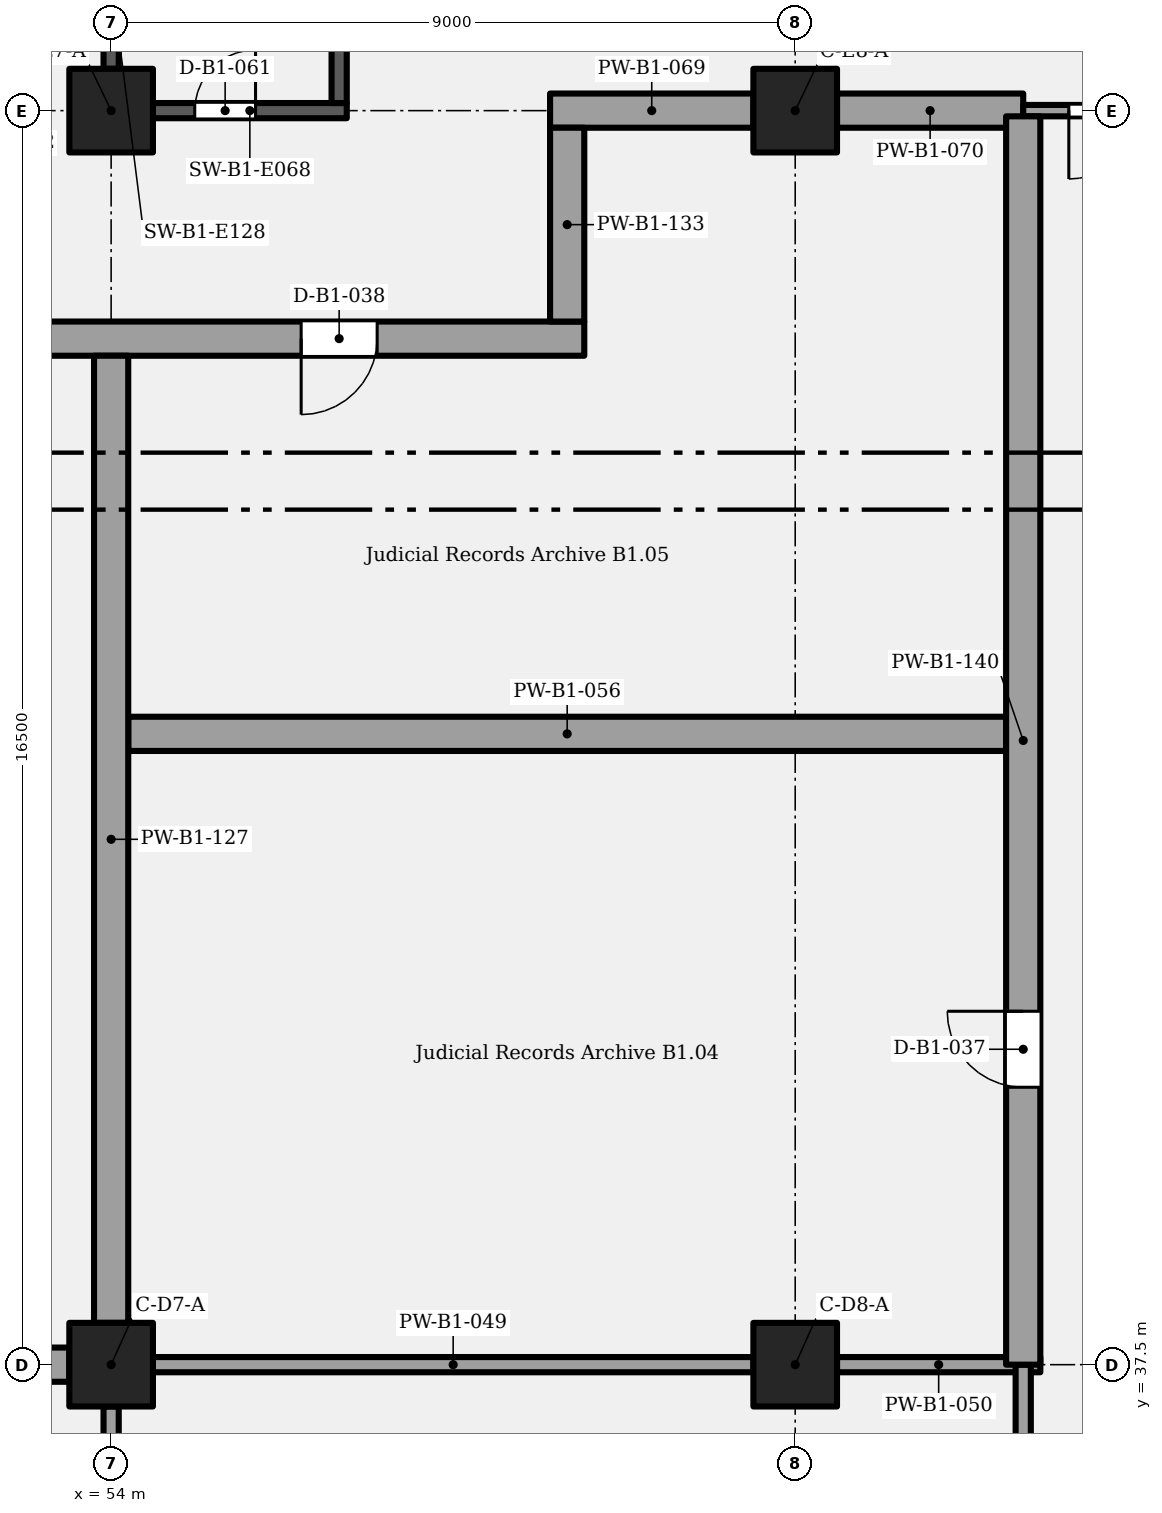
"""IFC4 building model, lengths in metres.
Left out: names, types, materials, properties, quantities, classifications, styles, units other than length and angle.
Written with IfcOpenShell. Run it as: python <this file> out.ifc"""

import sys

from ifc_helpers import new_model, si_unit, direction, frame, frame_2d, origin, origin_2d, place, context, subcontext, project, spatial, rectangle, extrude, element, fill, save


model = new_model("IFC4")
c1 = context("Model", 3, precision=1e-05, world=origin(), true_north=direction((0.0, 1.0)))
c2 = subcontext(c1, "Body", "Model", "MODEL_VIEW")
j1 = project(units=[si_unit("LENGTHUNIT", "METRE"), si_unit("PLANEANGLEUNIT", "RADIAN")], contexts=[c1])
p1 = place(None, origin())
s1 = spatial("IfcSite", under=j1, at=p1, CompositionType="ELEMENT")
p2 = place(p1, origin())
s2 = spatial("IfcBuilding", under=s1, at=p2, CompositionType="ELEMENT")
p3 = place(p2, frame((0.0, 0.0, -4.2)))
s3 = spatial("IfcBuildingStorey", under=s2, at=p3, CompositionType="ELEMENT", Elevation=-4.2)
for number, where, z_axis, x_axis in (
    (1, (54.0, 37.5, 0.0), (0.0, 0.0, 1.0), (1.0, 0.0, 0.0)),
    (2, (63.0, 37.5, 0.0), (0.0, 0.0, 1.0), (1.0, 0.0, 0.0)),
    (3, (54.0, 54.0, 0.0), (0.0, 0.0, 1.0), (1.0, 0.0, 0.0)),
    (4, (63.0, 54.0, 0.0), (0.0, 0.0, 1.0), (1.0, 0.0, 0.0)),
):
    element("IfcColumn", number, at=place(p3, frame(where, z_axis=z_axis, x_axis=x_axis)), inside=s3, PredefinedType="COLUMN", context=c2, shape_type="SweptSolid", body=[
        extrude(rectangle(XDim=1.1, YDim=1.1, at=origin_2d()), origin(), (0.0, 0.0, 1.0), 4.2),
    ])
p4 = place(p3, frame((45.55, 37.5, 0.0), z_axis=(0.0, 0.0, 1.0), x_axis=(1.0, 0.0, 0.0)))
e5 = element("IfcWall", 5, at=p4, inside=s3, PredefinedType="PARTITIONING", context=c2, shape_type="SweptSolid", body=[
    extrude(rectangle(XDim=7.9, YDim=0.45, at=frame_2d((3.95, 0.0))), origin(), (0.0, 0.0, 1.0), 3.15),
])
p5 = place(p3, frame((54.55, 37.5, 0.0), z_axis=(0.0, 0.0, 1.0), x_axis=(1.0, 0.0, 0.0)))
e6 = element("IfcWall", 6, at=p5, inside=s3, PredefinedType="PARTITIONING", context=c2, shape_type="SweptSolid", body=[
    extrude(rectangle(XDim=7.9, YDim=0.2, at=frame_2d((3.95, 0.0))), origin(), (0.0, 0.0, 1.0), 3.15),
])
p6 = place(p3, frame((63.55, 37.5, 0.0), z_axis=(0.0, 0.0, 1.0), x_axis=(1.0, 0.0, 0.0)))
e7 = element("IfcWall", 7, at=p6, inside=s3, PredefinedType="PARTITIONING", context=c2, shape_type="SweptSolid", body=[
    extrude(rectangle(XDim=2.675, YDim=0.2, at=frame_2d((1.337, 0.0))), origin(), (0.0, 0.0, 1.0), 3.15),
])
p7 = place(p3, frame((54.225, 45.8, 0.0), z_axis=(0.0, 0.0, 1.0), x_axis=(1.0, 0.0, 0.0)))
e8 = element("IfcWall", 8, at=p7, inside=s3, PredefinedType="PARTITIONING", context=c2, shape_type="SweptSolid", body=[
    extrude(rectangle(XDim=11.55, YDim=0.45, at=frame_2d((5.775, 0.0))), origin(), (0.0, 0.0, 1.0), 3.9),
])
p8 = place(p3, frame((35.775, 51.0, 0.0), z_axis=(0.0, 0.0, 1.0), x_axis=(1.0, 0.0, 0.0)))
e9 = element("IfcWall", 9, at=p8, inside=s3, PredefinedType="PARTITIONING", context=c2, shape_type="SweptSolid", body=[
    extrude(rectangle(XDim=24.45, YDim=0.45, at=frame_2d((12.225, 0.0))), origin(), (0.0, 0.0, 1.0), 3.9),
])
p9 = place(p8, frame((14.225, 0.0, 0.0), z_axis=(0.0, 0.0, 1.0), x_axis=(-1.0, 0.0, 0.0)))
e10 = element("IfcOpeningElement", 10, at=p9, cuts=e9, PredefinedType="OPENING", context=c2, shape_type="SweptSolid", body=[
    extrude(rectangle(XDim=1.0, YDim=2.1, at=frame_2d((0.5, 1.05))), frame((0.0, 0.235, 0.0), z_axis=(0.0, -1.0, 0.0), x_axis=(1.0, 0.0, 0.0)), (0.0, 0.0, 1.0), 0.47),
])
p10 = place(p8, frame((21.725, 0.0, 0.0), z_axis=(0.0, 0.0, 1.0), x_axis=(-1.0, 0.0, 0.0)))
e11 = element("IfcOpeningElement", 11, at=p10, cuts=e9, PredefinedType="OPENING", context=c2, shape_type="SweptSolid", body=[
    extrude(rectangle(XDim=1.0, YDim=2.1, at=frame_2d((0.5, 1.05))), frame((0.0, 0.235, 0.0), z_axis=(0.0, -1.0, 0.0), x_axis=(1.0, 0.0, 0.0)), (0.0, 0.0, 1.0), 0.47),
])
p11 = place(p3, frame((54.55, 54.0, 0.0), z_axis=(0.0, 0.0, 1.0), x_axis=(1.0, 0.0, 0.0)))
e12 = element("IfcWall", 12, at=p11, inside=s3, PredefinedType="SHEAR", context=c2, shape_type="SweptSolid", body=[
    extrude(rectangle(XDim=2.55, YDim=0.2, at=frame_2d((1.275, 0.0))), origin(), (0.0, 0.0, 1.0), 3.9),
])
p12 = place(p11, frame((0.55, 0.0, 0.0)))
e13 = element("IfcOpeningElement", 13, at=p12, cuts=e12, PredefinedType="OPENING", context=c2, shape_type="SweptSolid", body=[
    extrude(rectangle(XDim=0.8, YDim=2.0, at=frame_2d((0.4, 1.0))), frame((0.0, 0.11, 0.0), z_axis=(0.0, -1.0, 0.0), x_axis=(1.0, 0.0, 0.0)), (0.0, 0.0, 1.0), 0.22),
])
p13 = place(p3, frame((59.775, 54.0, 0.0), z_axis=(0.0, 0.0, 1.0), x_axis=(1.0, 0.0, 0.0)))
e14 = element("IfcWall", 14, at=p13, inside=s3, PredefinedType="PARTITIONING", context=c2, shape_type="SweptSolid", body=[
    extrude(rectangle(XDim=2.675, YDim=0.45, at=frame_2d((1.337, 0.0))), origin(), (0.0, 0.0, 1.0), 3.15),
])
p14 = place(p3, frame((63.55, 54.0, 0.0), z_axis=(0.0, 0.0, 1.0), x_axis=(1.0, 0.0, 0.0)))
e15 = element("IfcWall", 15, at=p14, inside=s3, PredefinedType="PARTITIONING", context=c2, shape_type="SweptSolid", body=[
    extrude(rectangle(XDim=2.45, YDim=0.45, at=frame_2d((1.225, 0.0))), origin(), (0.0, 0.0, 1.0), 3.15),
])
p15 = place(p3, frame((66.0, 54.0, 0.0), z_axis=(0.0, 0.0, 1.0), x_axis=(1.0, 0.0, 0.0)))
e16 = element("IfcWall", 16, at=p15, inside=s3, PredefinedType="PARTITIONING", context=c2, shape_type="SweptSolid", body=[
    extrude(rectangle(XDim=3.0, YDim=0.15, at=frame_2d((1.5, 0.0))), origin(), (0.0, 0.0, 1.0), 3.15),
])
p16 = place(p15, frame((2.4, 0.0, 0.0), z_axis=(0.0, 0.0, 1.0), x_axis=(-1.0, 0.0, 0.0)))
e17 = element("IfcOpeningElement", 17, at=p16, cuts=e16, PredefinedType="OPENING", context=c2, shape_type="SweptSolid", body=[
    extrude(rectangle(XDim=1.8, YDim=2.1, at=frame_2d((0.9, 1.05))), frame((0.0, 0.085, 0.0), z_axis=(0.0, -1.0, 0.0), x_axis=(1.0, 0.0, 0.0)), (0.0, 0.0, 1.0), 0.17),
])
p17 = place(p3, frame((54.0, 31.575, 0.0), z_axis=(0.0, 0.0, 1.0), x_axis=(0.0, 1.0, 0.0)))
e18 = element("IfcWall", 18, at=p17, inside=s3, PredefinedType="PARTITIONING", context=c2, shape_type="SweptSolid", body=[
    extrude(rectangle(XDim=5.375, YDim=0.2, at=frame_2d((2.688, 0.0))), origin(), (0.0, 0.0, 1.0), 3.15),
])
p18 = place(p3, frame((54.0, 38.05, 0.0), z_axis=(0.0, 0.0, 1.0), x_axis=(0.0, 1.0, 0.0)))
e19 = element("IfcWall", 19, at=p18, inside=s3, PredefinedType="PARTITIONING", context=c2, shape_type="SweptSolid", body=[
    extrude(rectangle(XDim=12.725, YDim=0.45, at=frame_2d((6.362, 0.0))), origin(), (0.0, 0.0, 1.0), 2.95),
])
p19 = place(p3, frame((54.0, 54.55, 0.0), z_axis=(0.0, 0.0, 1.0), x_axis=(0.0, 1.0, 0.0)))
e20 = element("IfcWall", 20, at=p19, inside=s3, PredefinedType="SHEAR", context=c2, shape_type="SweptSolid", body=[
    extrude(rectangle(XDim=2.45, YDim=0.2, at=frame_2d((1.225, 0.0))), origin(), (0.0, 0.0, 1.0), 3.9),
])
p20 = place(p3, frame((57.0, 54.1, 0.0), z_axis=(0.0, 0.0, 1.0), x_axis=(0.0, 1.0, 0.0)))
e21 = element("IfcWall", 21, at=p20, inside=s3, PredefinedType="SHEAR", context=c2, shape_type="SweptSolid", body=[
    extrude(rectangle(XDim=2.8, YDim=0.2, at=frame_2d((1.4, 0.0))), origin(), (0.0, 0.0, 1.0), 3.9),
])
p21 = place(p3, frame((60.0, 51.225, 0.0), z_axis=(0.0, 0.0, 1.0), x_axis=(0.0, 1.0, 0.0)))
e22 = element("IfcWall", 22, at=p21, inside=s3, PredefinedType="PARTITIONING", context=c2, shape_type="SweptSolid", body=[
    extrude(rectangle(XDim=2.55, YDim=0.45, at=frame_2d((1.275, 0.0))), origin(), (0.0, 0.0, 1.0), 3.9),
])
p22 = place(p3, frame((66.0, 31.5, 0.0), z_axis=(0.0, 0.0, 1.0), x_axis=(0.0, 1.0, 0.0)))
e23 = element("IfcWall", 23, at=p22, inside=s3, PredefinedType="PARTITIONING", context=c2, shape_type="SweptSolid", body=[
    extrude(rectangle(XDim=6.0, YDim=0.2, at=frame_2d((3.0, 0.0))), origin(), (0.0, 0.0, 1.0), 3.9),
])
p23 = place(p3, frame((66.0, 37.5, 0.0), z_axis=(0.0, 0.0, 1.0), x_axis=(0.0, 1.0, 0.0)))
e24 = element("IfcWall", 24, at=p23, inside=s3, PredefinedType="PARTITIONING", context=c2, shape_type="SweptSolid", body=[
    extrude(rectangle(XDim=16.425, YDim=0.45, at=frame_2d((8.212, 0.0))), origin(), (0.0, 0.0, 1.0), 3.9),
])
p24 = place(p23, frame((3.65, 0.0, 0.0)))
e25 = element("IfcOpeningElement", 25, at=p24, cuts=e24, PredefinedType="OPENING", context=c2, shape_type="SweptSolid", body=[
    extrude(rectangle(XDim=1.0, YDim=2.1, at=frame_2d((0.5, 1.05))), frame((0.0, 0.235, 0.0), z_axis=(0.0, -1.0, 0.0), x_axis=(1.0, 0.0, 0.0)), (0.0, 0.0, 1.0), 0.47),
])
p25 = place(p16, origin())
e26 = element("IfcDoor", 26, at=p25, inside=s3, OperationType="DOUBLE_DOOR_SINGLE_SWING", PredefinedType="DOOR", context=c2, shape_type="SweptSolid", body=[
    extrude(rectangle(XDim=1.8, YDim=2.1, at=frame_2d((0.9, 1.05))), frame((0.0, 0.025, 0.0), z_axis=(0.0, -1.0, 0.0), x_axis=(1.0, 0.0, 0.0)), (0.0, 0.0, 1.0), 0.05),
])
fill(e17, e26)
p26 = place(p24, origin())
e27 = element("IfcDoor", 27, at=p26, inside=s3, OperationType="SINGLE_SWING_RIGHT", PredefinedType="DOOR", context=c2, shape_type="SweptSolid", body=[
    extrude(rectangle(XDim=1.0, YDim=2.1, at=frame_2d((0.5, 1.05))), frame((0.0, 0.025, 0.0), z_axis=(0.0, -1.0, 0.0), x_axis=(1.0, 0.0, 0.0)), (0.0, 0.0, 1.0), 0.05),
])
fill(e25, e27)
p27 = place(p10, origin())
e28 = element("IfcDoor", 28, at=p27, inside=s3, OperationType="SINGLE_SWING_RIGHT", PredefinedType="DOOR", context=c2, shape_type="SweptSolid", body=[
    extrude(rectangle(XDim=1.0, YDim=2.1, at=frame_2d((0.5, 1.05))), frame((0.0, 0.025, 0.0), z_axis=(0.0, -1.0, 0.0), x_axis=(1.0, 0.0, 0.0)), (0.0, 0.0, 1.0), 0.05),
])
fill(e11, e28)
p28 = place(p12, origin())
e29 = element("IfcDoor", 29, at=p28, inside=s3, OperationType="SINGLE_SWING_RIGHT", PredefinedType="DOOR", context=c2, shape_type="SweptSolid", body=[
    extrude(rectangle(XDim=0.8, YDim=2.0, at=frame_2d((0.4, 1.0))), frame((0.0, 0.025, 0.0), z_axis=(0.0, -1.0, 0.0), x_axis=(1.0, 0.0, 0.0)), (0.0, 0.0, 1.0), 0.05),
])
fill(e13, e29)
save(model, sys.argv[1])
